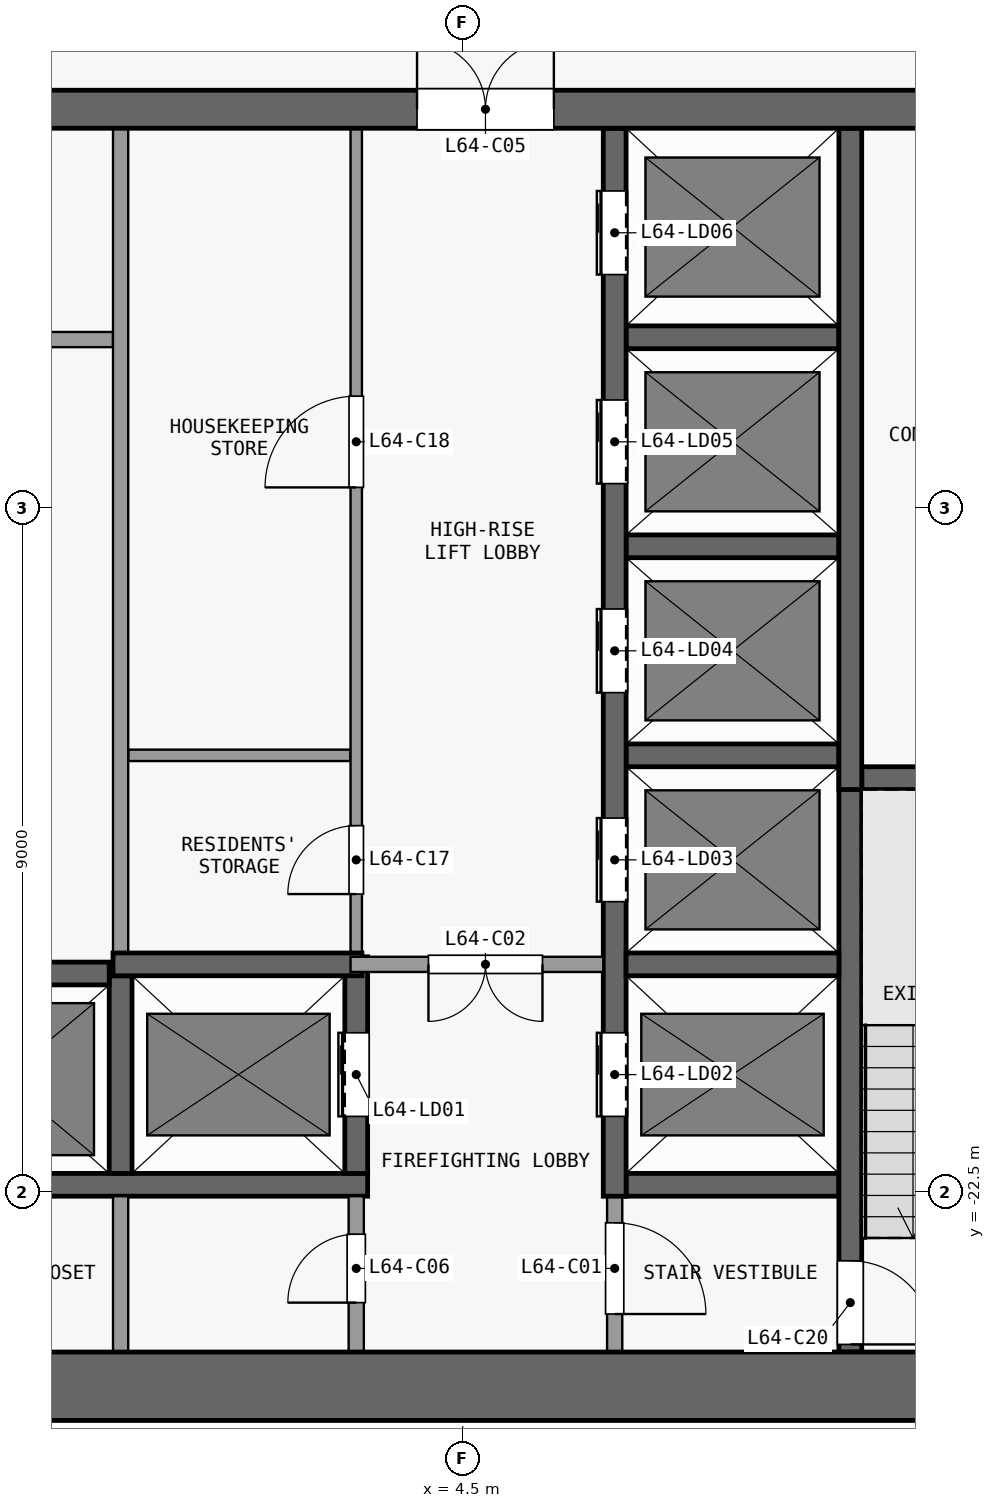
"""IFC4 building model, lengths in metres.
Left out: names, types, materials, properties, quantities, classifications, styles, units other than length and angle.
Written with IfcOpenShell. Run it as: python <this file> out.ifc"""

import sys

from ifc_helpers import new_model, si_unit, direction, frame, frame_2d, origin, place, context, subcontext, project, spatial, rectangle, extrude, element, fill, save


model = new_model("IFC4")
c1 = context("Model", 3, precision=1e-05, world=origin(), true_north=direction((0.0, 1.0)))
c2 = subcontext(c1, "Body", "Model", "MODEL_VIEW")
j1 = project(units=[si_unit("LENGTHUNIT", "METRE"), si_unit("PLANEANGLEUNIT", "RADIAN")], contexts=[c1])
p1 = place(None, origin())
s1 = spatial("IfcSite", under=j1, at=p1, CompositionType="ELEMENT")
p2 = place(p1, origin())
s2 = spatial("IfcBuilding", under=s1, at=p2, CompositionType="ELEMENT")
p3 = place(p2, frame((0.0, 0.0, 255.5)))
s3 = spatial("IfcBuildingStorey", under=s2, at=p3, CompositionType="ELEMENT", Elevation=255.5)
p4 = place(p3, frame((-13.1, -25.05, 0.0), z_axis=(0.0, 0.0, 1.0), x_axis=(1.0, 0.0, 0.0)))
e1 = element("IfcWall", 1, at=p4, inside=s3, PredefinedType="SHEAR", context=c2, shape_type="SweptSolid", body=[
    extrude(rectangle(XDim=26.2, YDim=0.9, at=frame_2d((13.1, 0.0))), origin(), (0.0, 0.0, 1.0), 3.3),
])
p5 = place(p3, frame((-13.1, -8.25, 0.0), z_axis=(0.0, 0.0, 1.0), x_axis=(1.0, 0.0, 0.0)))
e2 = element("IfcWall", 2, at=p5, inside=s3, PredefinedType="SHEAR", context=c2, shape_type="SweptSolid", body=[
    extrude(rectangle(XDim=26.2, YDim=0.5, at=frame_2d((13.1, 0.0))), origin(), (0.0, 0.0, 1.0), 3.3),
])
p6 = place(p5, frame((7.4, 0.0, 0.0)))
e3 = element("IfcOpeningElement", 3, at=p6, cuts=e2, PredefinedType="OPENING", context=c2, shape_type="SweptSolid", body=[
    extrude(rectangle(XDim=1.8, YDim=2.1, at=frame_2d((0.9, 1.05))), frame((0.0, 0.26, 0.0), z_axis=(0.0, -1.0, 0.0), x_axis=(1.0, 0.0, 0.0)), (0.0, 0.0, 1.0), 0.52),
])
p7 = place(p5, frame((17.0, 0.0, 0.0)))
e4 = element("IfcOpeningElement", 4, at=p7, cuts=e2, PredefinedType="OPENING", context=c2, shape_type="SweptSolid", body=[
    extrude(rectangle(XDim=1.8, YDim=2.1, at=frame_2d((0.9, 1.05))), frame((0.0, 0.26, 0.0), z_axis=(0.0, -1.0, 0.0), x_axis=(1.0, 0.0, 0.0)), (0.0, 0.0, 1.0), 0.52),
])
p8 = place(p5, frame((2.325, 0.0, 0.0)))
e5 = element("IfcOpeningElement", 5, at=p8, cuts=e2, PredefinedType="OPENING", context=c2, shape_type="SweptSolid", body=[
    extrude(rectangle(XDim=0.9, YDim=2.1, at=frame_2d((0.45, 1.05))), frame((0.0, 0.26, 0.0), z_axis=(0.0, -1.0, 0.0), x_axis=(1.0, 0.0, 0.0)), (0.0, 0.0, 1.0), 0.52),
])
p9 = place(p5, frame((23.675, 0.0, 0.0)))
e6 = element("IfcOpeningElement", 6, at=p9, cuts=e2, PredefinedType="OPENING", context=c2, shape_type="SweptSolid", body=[
    extrude(rectangle(XDim=1.2, YDim=2.1, at=frame_2d((0.6, 1.05))), frame((0.0, 0.26, 0.0), z_axis=(0.0, -1.0, 0.0), x_axis=(1.0, 0.0, 0.0)), (0.0, 0.0, 1.0), 0.52),
])
p10 = place(p3, frame((-3.25, -22.4, 0.0), z_axis=(0.0, 0.0, 1.0), x_axis=(1.0, 0.0, 0.0)))
e7 = element("IfcWall", 7, at=p10, inside=s3, PredefinedType="SHEAR", context=c2, shape_type="SweptSolid", body=[
    extrude(rectangle(XDim=6.5, YDim=0.3, at=frame_2d((3.25, 0.0))), origin(), (0.0, 0.0, 1.0), 3.3),
])
p11 = place(p3, frame((6.65, -22.4, 0.0), z_axis=(0.0, 0.0, 1.0), x_axis=(1.0, 0.0, 0.0)))
e8 = element("IfcWall", 8, at=p11, inside=s3, PredefinedType="SHEAR", context=c2, shape_type="SweptSolid", body=[
    extrude(rectangle(XDim=2.8, YDim=0.3, at=frame_2d((1.4, 0.0))), origin(), (0.0, 0.0, 1.0), 3.3),
])
p12 = place(p3, frame((-3.2, -19.62, 0.0), z_axis=(0.0, 0.0, 1.0), x_axis=(1.0, 0.0, 0.0)))
e9 = element("IfcWall", 9, at=p12, inside=s3, PredefinedType="SHEAR", context=c2, shape_type="SweptSolid", body=[
    extrude(rectangle(XDim=3.05, YDim=0.3, at=frame_2d((1.525, 0.0))), origin(), (0.0, 0.0, 1.0), 3.3),
])
p13 = place(p3, frame((-0.1, -19.5, 0.0), z_axis=(0.0, 0.0, 1.0), x_axis=(1.0, 0.0, 0.0)))
e10 = element("IfcWall", 10, at=p13, inside=s3, PredefinedType="SHEAR", context=c2, shape_type="SweptSolid", body=[
    extrude(rectangle(XDim=3.275, YDim=0.3, at=frame_2d((1.638, 0.0))), origin(), (0.0, 0.0, 1.0), 3.3),
])
p14 = place(p3, frame((6.35, -19.5, 0.0), z_axis=(0.0, 0.0, 1.0), x_axis=(-1.0, 0.0, 0.0)))
e11 = element("IfcWall", 11, at=p14, inside=s3, PredefinedType="PARTITIONING", context=c2, shape_type="SweptSolid", body=[
    extrude(rectangle(XDim=3.325, YDim=0.2, at=frame_2d((1.663, 0.0))), origin(), (0.0, 0.0, 1.0), 3.3),
])
p15 = place(p14, frame((0.8, 0.0, 0.0)))
e12 = element("IfcOpeningElement", 12, at=p15, cuts=e11, PredefinedType="OPENING", context=c2, shape_type="SweptSolid", body=[
    extrude(rectangle(XDim=1.5, YDim=2.1, at=frame_2d((0.75, 1.05))), frame((0.0, 0.11, 0.0), z_axis=(0.0, -1.0, 0.0), x_axis=(1.0, 0.0, 0.0)), (0.0, 0.0, 1.0), 0.22),
])
p16 = place(p3, frame((6.65, -19.5, 0.0), z_axis=(0.0, 0.0, 1.0), x_axis=(1.0, 0.0, 0.0)))
e13 = element("IfcWall", 13, at=p16, inside=s3, PredefinedType="SHEAR", context=c2, shape_type="SweptSolid", body=[
    extrude(rectangle(XDim=2.8, YDim=0.3, at=frame_2d((1.4, 0.0))), origin(), (0.0, 0.0, 1.0), 3.3),
])
p17 = place(p3, frame((9.75, -17.05, 0.0), z_axis=(0.0, 0.0, 1.0), x_axis=(1.0, 0.0, 0.0)))
e14 = element("IfcWall", 14, at=p17, inside=s3, PredefinedType="SHEAR", context=c2, shape_type="SweptSolid", body=[
    extrude(rectangle(XDim=2.85, YDim=0.3, at=frame_2d((1.425, 0.0))), origin(), (0.0, 0.0, 1.0), 3.3),
])
p18 = place(p3, frame((0.1, -16.75, 0.0), z_axis=(0.0, 0.0, 1.0), x_axis=(1.0, 0.0, 0.0)))
e15 = element("IfcWall", 15, at=p18, inside=s3, PredefinedType="PARTITIONING", context=c2, shape_type="SweptSolid", body=[
    extrude(rectangle(XDim=2.925, YDim=0.15, at=frame_2d((1.462, 0.0))), origin(), (0.0, 0.0, 1.0), 3.3),
])
for number, where, z_axis, x_axis in (
    (16, (6.65, -16.75, 0.0), (0.0, 0.0, 1.0), (1.0, 0.0, 0.0)),
    (17, (6.65, -14.0, 0.0), (0.0, 0.0, 1.0), (1.0, 0.0, 0.0)),
):
    element("IfcWall", number, at=place(p3, frame(where, z_axis=z_axis, x_axis=x_axis)), inside=s3, PredefinedType="SHEAR", context=c2, shape_type="SweptSolid", body=[
        extrude(rectangle(XDim=2.8, YDim=0.3, at=frame_2d((1.4, 0.0))), origin(), (0.0, 0.0, 1.0), 3.3),
    ])
p19 = place(p3, frame((-3.0, -11.28, 0.0), z_axis=(0.0, 0.0, 1.0), x_axis=(1.0, 0.0, 0.0)))
e18 = element("IfcWall", 18, at=p19, inside=s3, PredefinedType="PARTITIONING", context=c2, shape_type="SweptSolid", body=[
    extrude(rectangle(XDim=2.9, YDim=0.2, at=frame_2d((1.45, 0.0))), origin(), (0.0, 0.0, 1.0), 3.3),
])
p20 = place(p3, frame((6.65, -11.25, 0.0), z_axis=(0.0, 0.0, 1.0), x_axis=(1.0, 0.0, 0.0)))
e19 = element("IfcWall", 19, at=p20, inside=s3, PredefinedType="SHEAR", context=c2, shape_type="SweptSolid", body=[
    extrude(rectangle(XDim=2.8, YDim=0.3, at=frame_2d((1.4, 0.0))), origin(), (0.0, 0.0, 1.0), 3.3),
])
p21 = place(p3, frame((0.0, -24.6, 0.0), z_axis=(0.0, 0.0, 1.0), x_axis=(0.0, 1.0, 0.0)))
e20 = element("IfcWall", 20, at=p21, inside=s3, PredefinedType="PARTITIONING", context=c2, shape_type="SweptSolid", body=[
    extrude(rectangle(XDim=2.05, YDim=0.2, at=frame_2d((1.025, 0.0))), origin(), (0.0, 0.0, 1.0), 3.3),
])
p22 = place(p3, frame((0.0, -22.25, 0.0), z_axis=(0.0, 0.0, 1.0), x_axis=(0.0, 1.0, 0.0)))
e21 = element("IfcWall", 21, at=p22, inside=s3, PredefinedType="SHEAR", context=c2, shape_type="SweptSolid", body=[
    extrude(rectangle(XDim=2.6, YDim=0.3, at=frame_2d((1.3, 0.0))), origin(), (0.0, 0.0, 1.0), 3.3),
])
p23 = place(p3, frame((0.0, -19.35, 0.0), z_axis=(0.0, 0.0, 1.0), x_axis=(0.0, 1.0, 0.0)))
e22 = element("IfcWall", 22, at=p23, inside=s3, PredefinedType="PARTITIONING", context=c2, shape_type="SweptSolid", body=[
    extrude(rectangle(XDim=10.85, YDim=0.2, at=frame_2d((5.425, 0.0))), origin(), (0.0, 0.0, 1.0), 3.3),
])
p24 = place(p3, frame((3.1, -24.6, 0.0), z_axis=(0.0, 0.0, 1.0), x_axis=(0.0, 1.0, 0.0)))
e23 = element("IfcWall", 23, at=p24, inside=s3, PredefinedType="PARTITIONING", context=c2, shape_type="SweptSolid", body=[
    extrude(rectangle(XDim=2.05, YDim=0.2, at=frame_2d((1.025, 0.0))), origin(), (0.0, 0.0, 1.0), 3.3),
])
p25 = place(p24, frame((0.65, 0.0, 0.0)))
e24 = element("IfcOpeningElement", 24, at=p25, cuts=e23, PredefinedType="OPENING", context=c2, shape_type="SweptSolid", body=[
    extrude(rectangle(XDim=0.9, YDim=2.1, at=frame_2d((0.45, 1.05))), frame((0.0, 0.11, 0.0), z_axis=(0.0, -1.0, 0.0), x_axis=(1.0, 0.0, 0.0)), (0.0, 0.0, 1.0), 0.22),
])
p26 = place(p3, frame((3.1, -22.25, 0.0), z_axis=(0.0, 0.0, 1.0), x_axis=(0.0, 1.0, 0.0)))
e25 = element("IfcWall", 25, at=p26, inside=s3, PredefinedType="SHEAR", context=c2, shape_type="SweptSolid", body=[
    extrude(rectangle(XDim=2.85, YDim=0.3, at=frame_2d((1.425, 0.0))), origin(), (0.0, 0.0, 1.0), 3.3),
])
p27 = place(p26, frame((0.75, 0.0, 0.0)))
e26 = element("IfcOpeningElement", 26, at=p27, cuts=e25, PredefinedType="OPENING", context=c2, shape_type="SweptSolid", body=[
    extrude(rectangle(XDim=1.1, YDim=2.1, at=frame_2d((0.55, 1.05))), frame((0.0, 0.16, 0.0), z_axis=(0.0, -1.0, 0.0), x_axis=(1.0, 0.0, 0.0)), (0.0, 0.0, 1.0), 0.32),
])
p28 = place(p3, frame((3.1, -19.4, 0.0), z_axis=(0.0, 0.0, 1.0), x_axis=(0.0, 1.0, 0.0)))
e27 = element("IfcWall", 27, at=p28, inside=s3, PredefinedType="PARTITIONING", context=c2, shape_type="SweptSolid", body=[
    extrude(rectangle(XDim=10.9, YDim=0.15, at=frame_2d((5.45, 0.0))), origin(), (0.0, 0.0, 1.0), 3.3),
])
p29 = place(p28, frame((0.825, 0.0, 0.0)))
e28 = element("IfcOpeningElement", 28, at=p29, cuts=e27, PredefinedType="OPENING", context=c2, shape_type="SweptSolid", body=[
    extrude(rectangle(XDim=0.9, YDim=2.1, at=frame_2d((0.45, 1.05))), frame((0.0, 0.085, 0.0), z_axis=(0.0, -1.0, 0.0), x_axis=(1.0, 0.0, 0.0)), (0.0, 0.0, 1.0), 0.17),
])
p30 = place(p28, frame((6.175, 0.0, 0.0)))
e29 = element("IfcOpeningElement", 29, at=p30, cuts=e27, PredefinedType="OPENING", context=c2, shape_type="SweptSolid", body=[
    extrude(rectangle(XDim=1.2, YDim=2.1, at=frame_2d((0.6, 1.05))), frame((0.0, 0.085, 0.0), z_axis=(0.0, -1.0, 0.0), x_axis=(1.0, 0.0, 0.0)), (0.0, 0.0, 1.0), 0.17),
])
p31 = place(p3, frame((6.5, -22.55, 0.0), z_axis=(0.0, 0.0, 1.0), x_axis=(0.0, -1.0, 0.0)))
e30 = element("IfcWall", 30, at=p31, inside=s3, PredefinedType="PARTITIONING", context=c2, shape_type="SweptSolid", body=[
    extrude(rectangle(XDim=2.05, YDim=0.2, at=frame_2d((1.025, 0.0))), origin(), (0.0, 0.0, 1.0), 3.3),
])
p32 = place(p31, frame((0.35, 0.0, 0.0)))
e31 = element("IfcOpeningElement", 31, at=p32, cuts=e30, PredefinedType="OPENING", context=c2, shape_type="SweptSolid", body=[
    extrude(rectangle(XDim=1.2, YDim=2.1, at=frame_2d((0.6, 1.05))), frame((0.0, 0.11, 0.0), z_axis=(0.0, -1.0, 0.0), x_axis=(1.0, 0.0, 0.0)), (0.0, 0.0, 1.0), 0.22),
])
p33 = place(p3, frame((6.5, -22.55, 0.0), z_axis=(0.0, 0.0, 1.0), x_axis=(0.0, 1.0, 0.0)))
e32 = element("IfcWall", 32, at=p33, inside=s3, PredefinedType="SHEAR", context=c2, shape_type="SweptSolid", body=[
    extrude(rectangle(XDim=14.05, YDim=0.3, at=frame_2d((7.025, 0.0))), origin(), (0.0, 0.0, 1.0), 3.3),
])
p34 = place(p33, frame((1.05, 0.0, 0.0)))
e33 = element("IfcOpeningElement", 33, at=p34, cuts=e32, PredefinedType="OPENING", context=c2, shape_type="SweptSolid", body=[
    extrude(rectangle(XDim=1.1, YDim=2.1, at=frame_2d((0.55, 1.05))), frame((0.0, 0.16, 0.0), z_axis=(0.0, -1.0, 0.0), x_axis=(1.0, 0.0, 0.0)), (0.0, 0.0, 1.0), 0.32),
])
p35 = place(p33, frame((3.875, 0.0, 0.0)))
e34 = element("IfcOpeningElement", 34, at=p35, cuts=e32, PredefinedType="OPENING", context=c2, shape_type="SweptSolid", body=[
    extrude(rectangle(XDim=1.1, YDim=2.1, at=frame_2d((0.55, 1.05))), frame((0.0, 0.16, 0.0), z_axis=(0.0, -1.0, 0.0), x_axis=(1.0, 0.0, 0.0)), (0.0, 0.0, 1.0), 0.32),
])
p36 = place(p33, frame((6.625, 0.0, 0.0)))
e35 = element("IfcOpeningElement", 35, at=p36, cuts=e32, PredefinedType="OPENING", context=c2, shape_type="SweptSolid", body=[
    extrude(rectangle(XDim=1.1, YDim=2.1, at=frame_2d((0.55, 1.05))), frame((0.0, 0.16, 0.0), z_axis=(0.0, -1.0, 0.0), x_axis=(1.0, 0.0, 0.0)), (0.0, 0.0, 1.0), 0.32),
])
p37 = place(p33, frame((9.375, 0.0, 0.0)))
e36 = element("IfcOpeningElement", 36, at=p37, cuts=e32, PredefinedType="OPENING", context=c2, shape_type="SweptSolid", body=[
    extrude(rectangle(XDim=1.1, YDim=2.1, at=frame_2d((0.55, 1.05))), frame((0.0, 0.16, 0.0), z_axis=(0.0, -1.0, 0.0), x_axis=(1.0, 0.0, 0.0)), (0.0, 0.0, 1.0), 0.32),
])
p38 = place(p33, frame((12.125, 0.0, 0.0)))
e37 = element("IfcOpeningElement", 37, at=p38, cuts=e32, PredefinedType="OPENING", context=c2, shape_type="SweptSolid", body=[
    extrude(rectangle(XDim=1.1, YDim=2.1, at=frame_2d((0.55, 1.05))), frame((0.0, 0.16, 0.0), z_axis=(0.0, -1.0, 0.0), x_axis=(1.0, 0.0, 0.0)), (0.0, 0.0, 1.0), 0.32),
])
p39 = place(p3, frame((9.6, -16.9, 0.0), z_axis=(0.0, 0.0, 1.0), x_axis=(0.0, -1.0, 0.0)))
e38 = element("IfcWall", 38, at=p39, inside=s3, PredefinedType="SHEAR", context=c2, shape_type="SweptSolid", body=[
    extrude(rectangle(XDim=7.7, YDim=0.3, at=frame_2d((3.85, 0.0))), origin(), (0.0, 0.0, 1.0), 3.3),
])
p40 = place(p39, frame((6.5, 0.0, 0.0)))
e39 = element("IfcOpeningElement", 39, at=p40, cuts=e38, PredefinedType="OPENING", context=c2, shape_type="SweptSolid", body=[
    extrude(rectangle(XDim=1.1, YDim=2.1, at=frame_2d((0.55, 1.05))), frame((0.0, 0.16, 0.0), z_axis=(0.0, -1.0, 0.0), x_axis=(1.0, 0.0, 0.0)), (0.0, 0.0, 1.0), 0.32),
])
p41 = place(p3, frame((9.6, -17.2, 0.0), z_axis=(0.0, 0.0, 1.0), x_axis=(0.0, 1.0, 0.0)))
e40 = element("IfcWall", 40, at=p41, inside=s3, PredefinedType="SHEAR", context=c2, shape_type="SweptSolid", body=[
    extrude(rectangle(XDim=8.7, YDim=0.3, at=frame_2d((4.35, 0.0))), origin(), (0.0, 0.0, 1.0), 3.3),
])
p42 = place(p27, origin())
e41 = element("IfcDoor", 41, at=p42, inside=s3, OperationType="DOUBLE_DOOR_SLIDING", PredefinedType="DOOR", context=c2, shape_type="SweptSolid", body=[
    extrude(rectangle(XDim=1.1, YDim=2.1, at=frame_2d((0.55, 1.05))), frame((0.0, 0.025, 0.0), z_axis=(0.0, -1.0, 0.0), x_axis=(1.0, 0.0, 0.0)), (0.0, 0.0, 1.0), 0.05),
])
fill(e26, e41)
p43 = place(p34, origin())
e42 = element("IfcDoor", 42, at=p43, inside=s3, OperationType="DOUBLE_DOOR_SLIDING", PredefinedType="DOOR", context=c2, shape_type="SweptSolid", body=[
    extrude(rectangle(XDim=1.1, YDim=2.1, at=frame_2d((0.55, 1.05))), frame((0.0, 0.025, 0.0), z_axis=(0.0, -1.0, 0.0), x_axis=(1.0, 0.0, 0.0)), (0.0, 0.0, 1.0), 0.05),
])
fill(e33, e42)
p44 = place(p35, origin())
e43 = element("IfcDoor", 43, at=p44, inside=s3, OperationType="DOUBLE_DOOR_SLIDING", PredefinedType="DOOR", context=c2, shape_type="SweptSolid", body=[
    extrude(rectangle(XDim=1.1, YDim=2.1, at=frame_2d((0.55, 1.05))), frame((0.0, 0.025, 0.0), z_axis=(0.0, -1.0, 0.0), x_axis=(1.0, 0.0, 0.0)), (0.0, 0.0, 1.0), 0.05),
])
fill(e34, e43)
p45 = place(p36, origin())
e44 = element("IfcDoor", 44, at=p45, inside=s3, OperationType="DOUBLE_DOOR_SLIDING", PredefinedType="DOOR", context=c2, shape_type="SweptSolid", body=[
    extrude(rectangle(XDim=1.1, YDim=2.1, at=frame_2d((0.55, 1.05))), frame((0.0, 0.025, 0.0), z_axis=(0.0, -1.0, 0.0), x_axis=(1.0, 0.0, 0.0)), (0.0, 0.0, 1.0), 0.05),
])
fill(e35, e44)
p46 = place(p37, origin())
e45 = element("IfcDoor", 45, at=p46, inside=s3, OperationType="DOUBLE_DOOR_SLIDING", PredefinedType="DOOR", context=c2, shape_type="SweptSolid", body=[
    extrude(rectangle(XDim=1.1, YDim=2.1, at=frame_2d((0.55, 1.05))), frame((0.0, 0.025, 0.0), z_axis=(0.0, -1.0, 0.0), x_axis=(1.0, 0.0, 0.0)), (0.0, 0.0, 1.0), 0.05),
])
fill(e36, e45)
p47 = place(p38, origin())
e46 = element("IfcDoor", 46, at=p47, inside=s3, OperationType="DOUBLE_DOOR_SLIDING", PredefinedType="DOOR", context=c2, shape_type="SweptSolid", body=[
    extrude(rectangle(XDim=1.1, YDim=2.1, at=frame_2d((0.55, 1.05))), frame((0.0, 0.025, 0.0), z_axis=(0.0, -1.0, 0.0), x_axis=(1.0, 0.0, 0.0)), (0.0, 0.0, 1.0), 0.05),
])
fill(e37, e46)
p48 = place(p32, origin())
e47 = element("IfcDoor", 47, at=p48, inside=s3, OperationType="SINGLE_SWING_RIGHT", PredefinedType="DOOR", context=c2, shape_type="SweptSolid", body=[
    extrude(rectangle(XDim=1.2, YDim=2.1, at=frame_2d((0.6, 1.05))), frame((0.0, 0.025, 0.0), z_axis=(0.0, -1.0, 0.0), x_axis=(1.0, 0.0, 0.0)), (0.0, 0.0, 1.0), 0.05),
])
fill(e31, e47)
p49 = place(p15, origin())
e48 = element("IfcDoor", 48, at=p49, inside=s3, OperationType="DOUBLE_DOOR_SINGLE_SWING", PredefinedType="DOOR", context=c2, shape_type="SweptSolid", body=[
    extrude(rectangle(XDim=1.5, YDim=2.1, at=frame_2d((0.75, 1.05))), frame((0.0, 0.025, 0.0), z_axis=(0.0, -1.0, 0.0), x_axis=(1.0, 0.0, 0.0)), (0.0, 0.0, 1.0), 0.05),
])
fill(e12, e48)
p50 = place(p7, origin())
e49 = element("IfcDoor", 49, at=p50, inside=s3, OperationType="DOUBLE_DOOR_SINGLE_SWING", PredefinedType="DOOR", context=c2, shape_type="SweptSolid", body=[
    extrude(rectangle(XDim=1.8, YDim=2.1, at=frame_2d((0.9, 1.05))), frame((0.0, 0.025, 0.0), z_axis=(0.0, -1.0, 0.0), x_axis=(1.0, 0.0, 0.0)), (0.0, 0.0, 1.0), 0.05),
])
fill(e4, e49)
p51 = place(p25, origin())
e50 = element("IfcDoor", 50, at=p51, inside=s3, OperationType="SINGLE_SWING_LEFT", PredefinedType="DOOR", context=c2, shape_type="SweptSolid", body=[
    extrude(rectangle(XDim=0.9, YDim=2.1, at=frame_2d((0.45, 1.05))), frame((0.0, 0.025, 0.0), z_axis=(0.0, -1.0, 0.0), x_axis=(1.0, 0.0, 0.0)), (0.0, 0.0, 1.0), 0.05),
])
fill(e24, e50)
p52 = place(p29, origin())
e51 = element("IfcDoor", 51, at=p52, inside=s3, OperationType="SINGLE_SWING_LEFT", PredefinedType="DOOR", context=c2, shape_type="SweptSolid", body=[
    extrude(rectangle(XDim=0.9, YDim=2.1, at=frame_2d((0.45, 1.05))), frame((0.0, 0.025, 0.0), z_axis=(0.0, -1.0, 0.0), x_axis=(1.0, 0.0, 0.0)), (0.0, 0.0, 1.0), 0.05),
])
fill(e28, e51)
p53 = place(p30, origin())
e52 = element("IfcDoor", 52, at=p53, inside=s3, OperationType="SINGLE_SWING_LEFT", PredefinedType="DOOR", context=c2, shape_type="SweptSolid", body=[
    extrude(rectangle(XDim=1.2, YDim=2.1, at=frame_2d((0.6, 1.05))), frame((0.0, 0.025, 0.0), z_axis=(0.0, -1.0, 0.0), x_axis=(1.0, 0.0, 0.0)), (0.0, 0.0, 1.0), 0.05),
])
fill(e29, e52)
p54 = place(p40, origin())
e53 = element("IfcDoor", 53, at=p54, inside=s3, OperationType="SINGLE_SWING_RIGHT", PredefinedType="DOOR", context=c2, shape_type="SweptSolid", body=[
    extrude(rectangle(XDim=1.1, YDim=2.1, at=frame_2d((0.55, 1.05))), frame((0.0, 0.025, 0.0), z_axis=(0.0, -1.0, 0.0), x_axis=(1.0, 0.0, 0.0)), (0.0, 0.0, 1.0), 0.05),
])
fill(e39, e53)
save(model, sys.argv[1])
